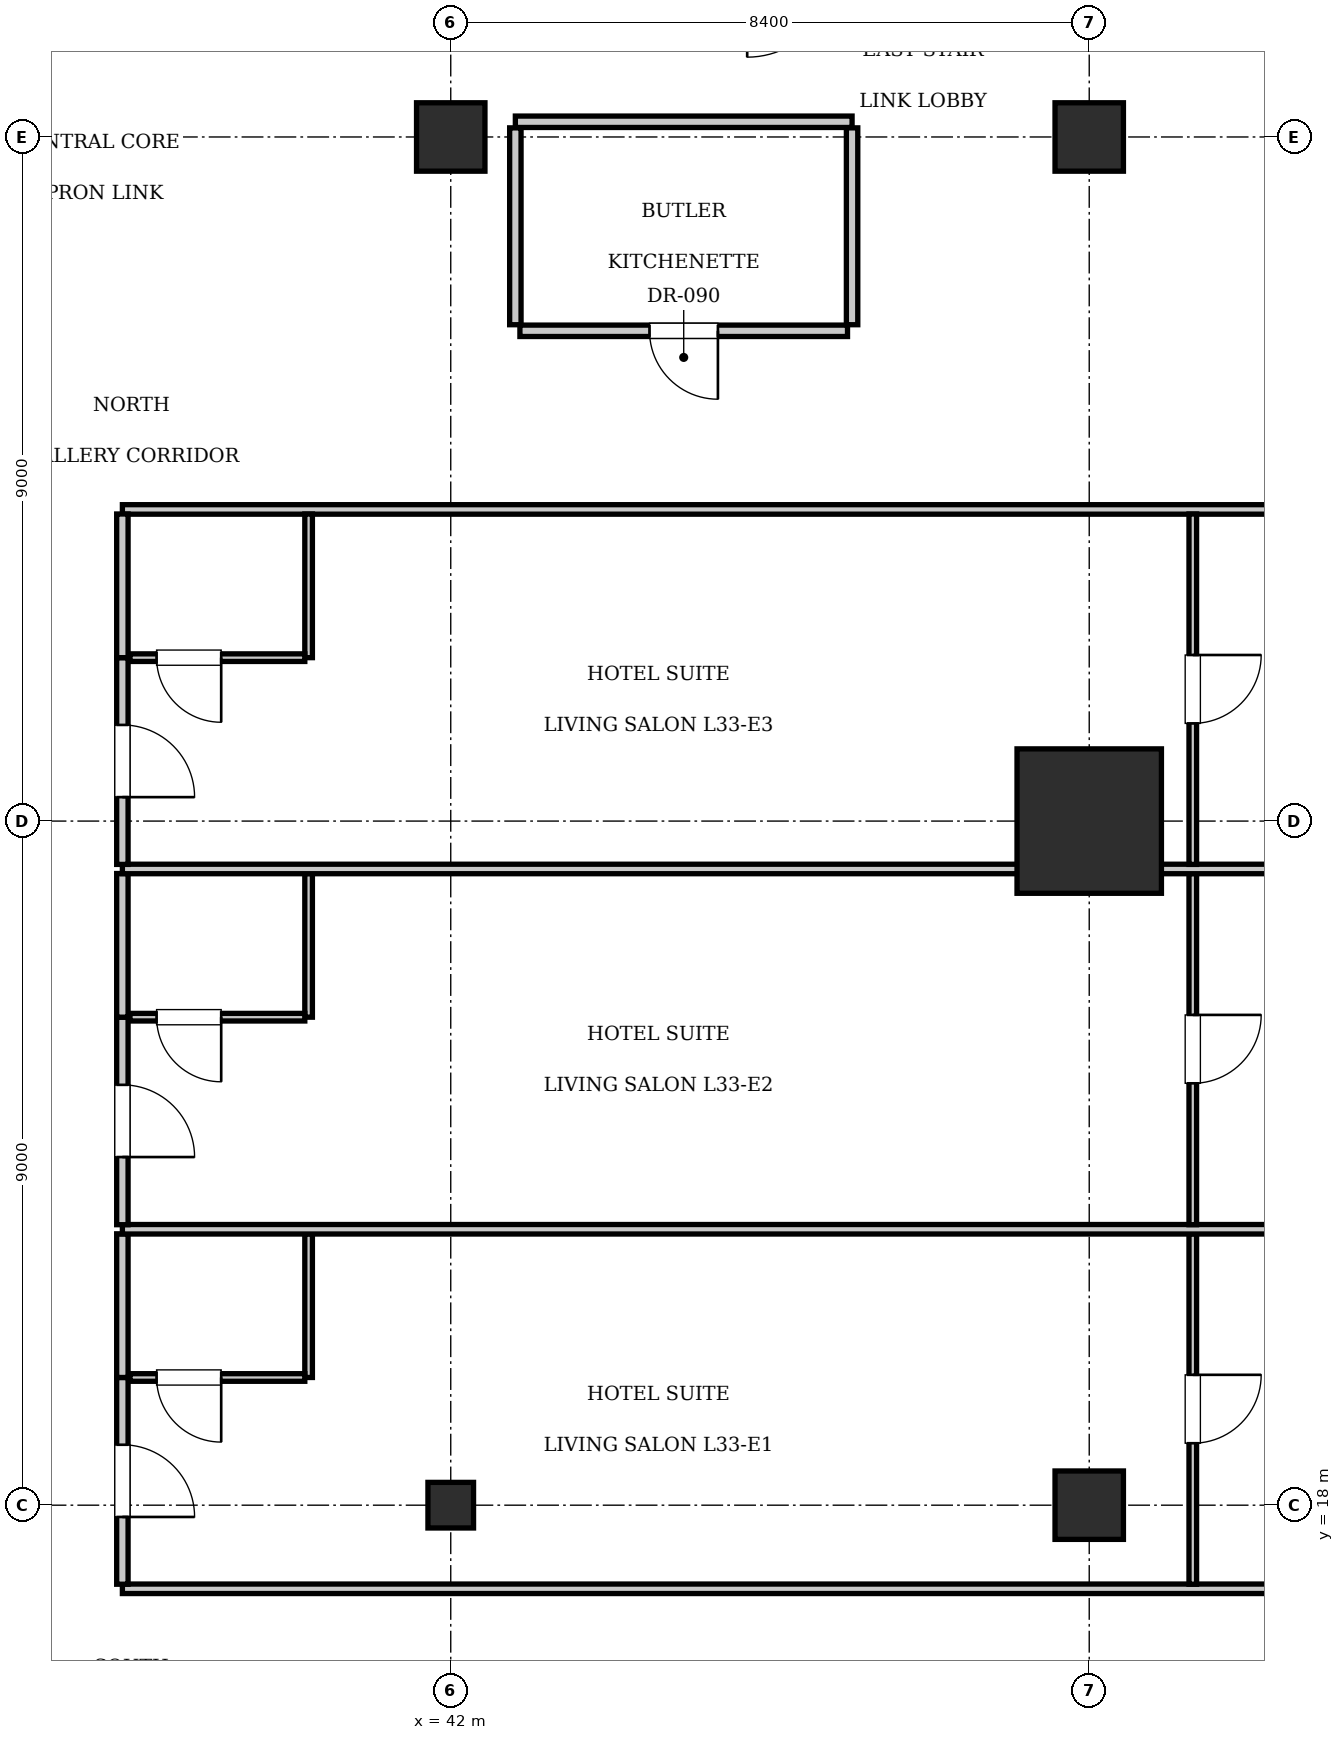
"""IFC4 building model, lengths in metres.
Left out: names, types, materials, properties, quantities, classifications, styles, units other than length and angle.
Written with IfcOpenShell. Run it as: python <this file> out.ifc"""

import sys

from ifc_helpers import new_model, si_unit, direction, frame, frame_2d, origin, origin_2d, place, context, subcontext, project, spatial, rectangle, i_section, extrude, element, fill, save


model = new_model("IFC4")
c1 = context("Model", 3, precision=1e-05, world=origin(), true_north=direction((0.0, 1.0)))
c2 = subcontext(c1, "Body", "Model", "MODEL_VIEW")
j1 = project(units=[si_unit("LENGTHUNIT", "METRE"), si_unit("PLANEANGLEUNIT", "RADIAN")], contexts=[c1])
p1 = place(None, origin())
s1 = spatial("IfcSite", under=j1, at=p1, CompositionType="ELEMENT")
p2 = place(p1, origin())
s2 = spatial("IfcBuilding", under=s1, at=p2, CompositionType="ELEMENT")
p3 = place(p2, frame((0.0, 0.0, 138.95)))
s3 = spatial("IfcBuildingStorey", under=s2, at=p3, CompositionType="ELEMENT", Elevation=138.95)
p4 = place(p3, frame((50.4, 27.0, 0.0), z_axis=(0.0, 0.0, 1.0), x_axis=(1.0, 0.0, 0.0)))
e1 = element("IfcColumn", 1, at=p4, inside=s3, PredefinedType="COLUMN", context=c2, shape_type="SweptSolid", body=[
    extrude(rectangle(XDim=1.9, YDim=1.9, at=origin_2d()), origin(), (0.0, 0.0, 1.0), 3.85),
])
for number, where, z_axis, x_axis in (
    (2, (42.0, 36.0, 0.0), (0.0, 0.0, 1.0), (1.0, 0.0, 0.0)),
    (3, (50.4, 36.0, 0.0), (0.0, 0.0, 1.0), (1.0, 0.0, 0.0)),
    (4, (50.4, 18.0, 0.0), (0.0, 0.0, 1.0), (1.0, 0.0, 0.0)),
):
    element("IfcColumn", number, at=place(p3, frame(where, z_axis=z_axis, x_axis=x_axis)), inside=s3, PredefinedType="COLUMN", context=c2, shape_type="SweptSolid", body=[
        extrude(rectangle(XDim=0.9, YDim=0.9, at=origin_2d()), origin(), (0.0, 0.0, 1.0), 3.85),
    ])
p5 = place(p3, frame((42.0, 18.0, 0.0), z_axis=(0.0, 0.0, 1.0), x_axis=(1.0, 0.0, 0.0)))
e5 = element("IfcColumn", 5, at=p5, inside=s3, PredefinedType="COLUMN", context=c2, shape_type="SweptSolid", body=[
    extrude(i_section(OverallWidth=0.6, OverallDepth=0.6, WebThickness=0.025, FlangeThickness=0.038, at=origin_2d()), origin(), (0.0, 0.0, 1.0), 3.85),
])
p6 = place(p3, frame((42.85, 36.2, 0.0), z_axis=(0.0, 0.0, 1.0), x_axis=(1.0, 0.0, 0.0)))
e6 = element("IfcWall", 6, at=p6, inside=s3, PredefinedType="PARTITIONING", context=c2, shape_type="SweptSolid", body=[
    extrude(rectangle(XDim=4.43, YDim=0.15, at=frame_2d((2.215, 0.0))), origin(), (0.0, 0.0, 1.0), 3.61),
])
for number, where, z_axis, x_axis in (
    (7, (42.85, 33.53, 0.0), (0.0, 0.0, 1.0), (0.0, 1.0, 0.0)),
    (8, (47.28, 33.53, 0.0), (0.0, 0.0, 1.0), (0.0, 1.0, 0.0)),
):
    element("IfcWall", number, at=place(p3, frame(where, z_axis=z_axis, x_axis=x_axis)), inside=s3, PredefinedType="PARTITIONING", context=c2, shape_type="SweptSolid", body=[
        extrude(rectangle(XDim=2.59, YDim=0.15, at=frame_2d((1.295, 0.0))), origin(), (0.0, 0.0, 1.0), 3.61),
    ])
p7 = place(p3, frame((42.91, 33.45, 0.0), z_axis=(0.0, 0.0, 1.0), x_axis=(1.0, 0.0, 0.0)))
e9 = element("IfcWall", 9, at=p7, inside=s3, PredefinedType="PARTITIONING", context=c2, shape_type="SweptSolid", body=[
    extrude(rectangle(XDim=4.31, YDim=0.15, at=frame_2d((2.155, 0.0))), origin(), (0.0, 0.0, 1.0), 3.61),
])
p8 = place(p7, frame((1.705, 0.0, 0.0)))
e10 = element("IfcOpeningElement", 10, at=p8, cuts=e9, PredefinedType="OPENING", context=c2, shape_type="SweptSolid", body=[
    extrude(rectangle(XDim=0.9, YDim=2.1, at=frame_2d((0.45, 1.05))), frame((0.0, 0.085, 0.0), z_axis=(0.0, -1.0, 0.0), x_axis=(1.0, 0.0, 0.0)), (0.0, 0.0, 1.0), 0.17),
])
for number, where, z_axis, x_axis in (
    (11, (37.68, 16.9, 0.0), (0.0, 0.0, 1.0), (1.0, 0.0, 0.0)),
    (12, (37.68, 31.1, 0.0), (0.0, 0.0, 1.0), (1.0, 0.0, 0.0)),
):
    element("IfcWall", number, at=place(p3, frame(where, z_axis=z_axis, x_axis=x_axis)), inside=s3, PredefinedType="PARTITIONING", context=c2, shape_type="SweptSolid", body=[
        extrude(rectangle(XDim=24.72, YDim=0.125, at=frame_2d((12.36, 0.0))), origin(), (0.0, 0.0, 1.0), 3.61),
    ])
p9 = place(p3, frame((37.68, 16.96, 0.0), z_axis=(0.0, 0.0, 1.0), x_axis=(0.0, 1.0, 0.0)))
e13 = element("IfcWall", 13, at=p9, inside=s3, PredefinedType="PARTITIONING", context=c2, shape_type="SweptSolid", body=[
    extrude(rectangle(XDim=2.72, YDim=0.15, at=frame_2d((1.36, 0.0))), origin(), (0.0, 0.0, 1.0), 3.255),
])
p10 = place(p9, frame((0.885, 0.0, 0.0)))
e14 = element("IfcOpeningElement", 14, at=p10, cuts=e13, PredefinedType="OPENING", context=c2, shape_type="SweptSolid", body=[
    extrude(rectangle(XDim=0.95, YDim=2.15, at=frame_2d((0.475, 1.075))), frame((0.0, 0.085, 0.0), z_axis=(0.0, -1.0, 0.0), x_axis=(1.0, 0.0, 0.0)), (0.0, 0.0, 1.0), 0.17),
])
p11 = place(p3, frame((37.68, 19.68, 0.0), z_axis=(0.0, 0.0, 1.0), x_axis=(0.0, 1.0, 0.0)))
e15 = element("IfcWall", 15, at=p11, inside=s3, PredefinedType="PARTITIONING", context=c2, shape_type="SweptSolid", body=[
    extrude(rectangle(XDim=1.89, YDim=0.15, at=frame_2d((0.945, 0.0))), origin(), (0.0, 0.0, 1.0), 3.61),
])
p12 = place(p3, frame((40.13, 19.68, 0.0), z_axis=(0.0, 0.0, 1.0), x_axis=(0.0, 1.0, 0.0)))
e16 = element("IfcWall", 16, at=p12, inside=s3, PredefinedType="PARTITIONING", context=c2, shape_type="SweptSolid", body=[
    extrude(rectangle(XDim=1.89, YDim=0.1, at=frame_2d((0.945, 0.0))), origin(), (0.0, 0.0, 1.0), 3.61),
])
p13 = place(p3, frame((37.78, 19.68, 0.0), z_axis=(0.0, 0.0, 1.0), x_axis=(1.0, 0.0, 0.0)))
e17 = element("IfcWall", 17, at=p13, inside=s3, PredefinedType="PARTITIONING", context=c2, shape_type="SweptSolid", body=[
    extrude(rectangle(XDim=2.3, YDim=0.1, at=frame_2d((1.15, 0.0))), origin(), (0.0, 0.0, 1.0), 3.61),
])
p14 = place(p13, frame((0.35, 0.0, 0.0)))
e18 = element("IfcOpeningElement", 18, at=p14, cuts=e17, PredefinedType="OPENING", context=c2, shape_type="SweptSolid", body=[
    extrude(rectangle(XDim=0.85, YDim=2.1, at=frame_2d((0.425, 1.05))), frame((0.0, 0.06, 0.0), z_axis=(0.0, -1.0, 0.0), x_axis=(1.0, 0.0, 0.0)), (0.0, 0.0, 1.0), 0.12),
])
p15 = place(p3, frame((51.762, 16.96, 0.0), z_axis=(0.0, 0.0, 1.0), x_axis=(0.0, 1.0, 0.0)))
e19 = element("IfcWall", 19, at=p15, inside=s3, PredefinedType="PARTITIONING", context=c2, shape_type="SweptSolid", body=[
    extrude(rectangle(XDim=4.61, YDim=0.1, at=frame_2d((2.305, 0.0))), origin(), (0.0, 0.0, 1.0), 3.61),
])
p16 = place(p15, frame((1.855, 0.0, 0.0)))
e20 = element("IfcOpeningElement", 20, at=p16, cuts=e19, PredefinedType="OPENING", context=c2, shape_type="SweptSolid", body=[
    extrude(rectangle(XDim=0.9, YDim=2.1, at=frame_2d((0.45, 1.05))), frame((0.0, 0.06, 0.0), z_axis=(0.0, -1.0, 0.0), x_axis=(1.0, 0.0, 0.0)), (0.0, 0.0, 1.0), 0.12),
])
p17 = place(p3, frame((37.68, 21.63, 0.0), z_axis=(0.0, 0.0, 1.0), x_axis=(1.0, 0.0, 0.0)))
e21 = element("IfcWall", 21, at=p17, inside=s3, PredefinedType="PARTITIONING", context=c2, shape_type="SweptSolid", body=[
    extrude(rectangle(XDim=24.72, YDim=0.125, at=frame_2d((12.36, 0.0))), origin(), (0.0, 0.0, 1.0), 3.61),
])
p18 = place(p3, frame((37.68, 21.69, 0.0), z_axis=(0.0, 0.0, 1.0), x_axis=(0.0, 1.0, 0.0)))
e22 = element("IfcWall", 22, at=p18, inside=s3, PredefinedType="PARTITIONING", context=c2, shape_type="SweptSolid", body=[
    extrude(rectangle(XDim=2.73, YDim=0.15, at=frame_2d((1.365, 0.0))), origin(), (0.0, 0.0, 1.0), 3.61),
])
p19 = place(p18, frame((0.89, 0.0, 0.0)))
e23 = element("IfcOpeningElement", 23, at=p19, cuts=e22, PredefinedType="OPENING", context=c2, shape_type="SweptSolid", body=[
    extrude(rectangle(XDim=0.95, YDim=2.15, at=frame_2d((0.475, 1.075))), frame((0.0, 0.085, 0.0), z_axis=(0.0, -1.0, 0.0), x_axis=(1.0, 0.0, 0.0)), (0.0, 0.0, 1.0), 0.17),
])
p20 = place(p3, frame((37.68, 24.42, 0.0), z_axis=(0.0, 0.0, 1.0), x_axis=(0.0, 1.0, 0.0)))
e24 = element("IfcWall", 24, at=p20, inside=s3, PredefinedType="PARTITIONING", context=c2, shape_type="SweptSolid", body=[
    extrude(rectangle(XDim=1.89, YDim=0.15, at=frame_2d((0.945, 0.0))), origin(), (0.0, 0.0, 1.0), 3.61),
])
p21 = place(p3, frame((40.13, 24.42, 0.0), z_axis=(0.0, 0.0, 1.0), x_axis=(0.0, 1.0, 0.0)))
e25 = element("IfcWall", 25, at=p21, inside=s3, PredefinedType="PARTITIONING", context=c2, shape_type="SweptSolid", body=[
    extrude(rectangle(XDim=1.89, YDim=0.1, at=frame_2d((0.945, 0.0))), origin(), (0.0, 0.0, 1.0), 3.61),
])
p22 = place(p3, frame((37.78, 24.42, 0.0), z_axis=(0.0, 0.0, 1.0), x_axis=(1.0, 0.0, 0.0)))
e26 = element("IfcWall", 26, at=p22, inside=s3, PredefinedType="PARTITIONING", context=c2, shape_type="SweptSolid", body=[
    extrude(rectangle(XDim=2.3, YDim=0.1, at=frame_2d((1.15, 0.0))), origin(), (0.0, 0.0, 1.0), 3.61),
])
p23 = place(p22, frame((0.35, 0.0, 0.0)))
e27 = element("IfcOpeningElement", 27, at=p23, cuts=e26, PredefinedType="OPENING", context=c2, shape_type="SweptSolid", body=[
    extrude(rectangle(XDim=0.85, YDim=2.1, at=frame_2d((0.425, 1.05))), frame((0.0, 0.06, 0.0), z_axis=(0.0, -1.0, 0.0), x_axis=(1.0, 0.0, 0.0)), (0.0, 0.0, 1.0), 0.12),
])
p24 = place(p3, frame((51.762, 21.69, 0.0), z_axis=(0.0, 0.0, 1.0), x_axis=(0.0, 1.0, 0.0)))
e28 = element("IfcWall", 28, at=p24, inside=s3, PredefinedType="PARTITIONING", context=c2, shape_type="SweptSolid", body=[
    extrude(rectangle(XDim=4.62, YDim=0.1, at=frame_2d((2.31, 0.0))), origin(), (0.0, 0.0, 1.0), 3.61),
])
p25 = place(p24, frame((1.86, 0.0, 0.0)))
e29 = element("IfcOpeningElement", 29, at=p25, cuts=e28, PredefinedType="OPENING", context=c2, shape_type="SweptSolid", body=[
    extrude(rectangle(XDim=0.9, YDim=2.1, at=frame_2d((0.45, 1.05))), frame((0.0, 0.06, 0.0), z_axis=(0.0, -1.0, 0.0), x_axis=(1.0, 0.0, 0.0)), (0.0, 0.0, 1.0), 0.12),
])
p26 = place(p3, frame((37.68, 26.37, 0.0), z_axis=(0.0, 0.0, 1.0), x_axis=(1.0, 0.0, 0.0)))
e30 = element("IfcWall", 30, at=p26, inside=s3, PredefinedType="PARTITIONING", context=c2, shape_type="SweptSolid", body=[
    extrude(rectangle(XDim=24.72, YDim=0.125, at=frame_2d((12.36, 0.0))), origin(), (0.0, 0.0, 1.0), 3.61),
])
p27 = place(p3, frame((37.68, 26.43, 0.0), z_axis=(0.0, 0.0, 1.0), x_axis=(0.0, 1.0, 0.0)))
e31 = element("IfcWall", 31, at=p27, inside=s3, PredefinedType="PARTITIONING", context=c2, shape_type="SweptSolid", body=[
    extrude(rectangle(XDim=2.72, YDim=0.15, at=frame_2d((1.36, 0.0))), origin(), (0.0, 0.0, 1.0), 3.61),
])
p28 = place(p27, frame((0.885, 0.0, 0.0)))
e32 = element("IfcOpeningElement", 32, at=p28, cuts=e31, PredefinedType="OPENING", context=c2, shape_type="SweptSolid", body=[
    extrude(rectangle(XDim=0.95, YDim=2.15, at=frame_2d((0.475, 1.075))), frame((0.0, 0.085, 0.0), z_axis=(0.0, -1.0, 0.0), x_axis=(1.0, 0.0, 0.0)), (0.0, 0.0, 1.0), 0.17),
])
p29 = place(p3, frame((37.68, 29.15, 0.0), z_axis=(0.0, 0.0, 1.0), x_axis=(0.0, 1.0, 0.0)))
e33 = element("IfcWall", 33, at=p29, inside=s3, PredefinedType="PARTITIONING", context=c2, shape_type="SweptSolid", body=[
    extrude(rectangle(XDim=1.89, YDim=0.15, at=frame_2d((0.945, 0.0))), origin(), (0.0, 0.0, 1.0), 3.61),
])
p30 = place(p3, frame((40.13, 29.15, 0.0), z_axis=(0.0, 0.0, 1.0), x_axis=(0.0, 1.0, 0.0)))
e34 = element("IfcWall", 34, at=p30, inside=s3, PredefinedType="PARTITIONING", context=c2, shape_type="SweptSolid", body=[
    extrude(rectangle(XDim=1.89, YDim=0.1, at=frame_2d((0.945, 0.0))), origin(), (0.0, 0.0, 1.0), 3.61),
])
p31 = place(p3, frame((37.78, 29.15, 0.0), z_axis=(0.0, 0.0, 1.0), x_axis=(1.0, 0.0, 0.0)))
e35 = element("IfcWall", 35, at=p31, inside=s3, PredefinedType="PARTITIONING", context=c2, shape_type="SweptSolid", body=[
    extrude(rectangle(XDim=2.3, YDim=0.1, at=frame_2d((1.15, 0.0))), origin(), (0.0, 0.0, 1.0), 3.61),
])
p32 = place(p31, frame((0.35, 0.0, 0.0)))
e36 = element("IfcOpeningElement", 36, at=p32, cuts=e35, PredefinedType="OPENING", context=c2, shape_type="SweptSolid", body=[
    extrude(rectangle(XDim=0.85, YDim=2.1, at=frame_2d((0.425, 1.05))), frame((0.0, 0.06, 0.0), z_axis=(0.0, -1.0, 0.0), x_axis=(1.0, 0.0, 0.0)), (0.0, 0.0, 1.0), 0.12),
])
p33 = place(p3, frame((51.762, 26.43, 0.0), z_axis=(0.0, 0.0, 1.0), x_axis=(0.0, 1.0, 0.0)))
e37 = element("IfcWall", 37, at=p33, inside=s3, PredefinedType="PARTITIONING", context=c2, shape_type="SweptSolid", body=[
    extrude(rectangle(XDim=4.61, YDim=0.1, at=frame_2d((2.305, 0.0))), origin(), (0.0, 0.0, 1.0), 3.61),
])
p34 = place(p33, frame((1.855, 0.0, 0.0)))
e38 = element("IfcOpeningElement", 38, at=p34, cuts=e37, PredefinedType="OPENING", context=c2, shape_type="SweptSolid", body=[
    extrude(rectangle(XDim=0.9, YDim=2.1, at=frame_2d((0.45, 1.05))), frame((0.0, 0.06, 0.0), z_axis=(0.0, -1.0, 0.0), x_axis=(1.0, 0.0, 0.0)), (0.0, 0.0, 1.0), 0.12),
])
p35 = place(p8, frame((0.9, 0.0, 0.0), z_axis=(0.0, 0.0, 1.0), x_axis=(-1.0, 0.0, 0.0)))
e39 = element("IfcDoor", 39, at=p35, inside=s3, OperationType="SINGLE_SWING_LEFT", PredefinedType="DOOR", context=c2, shape_type="SweptSolid", body=[
    extrude(rectangle(XDim=0.9, YDim=2.1, at=frame_2d((0.45, 1.05))), frame((0.0, 0.025, 0.0), z_axis=(0.0, -1.0, 0.0), x_axis=(1.0, 0.0, 0.0)), (0.0, 0.0, 1.0), 0.05),
])
fill(e10, e39)
p36 = place(p14, frame((0.85, 0.0, 0.0), z_axis=(0.0, 0.0, 1.0), x_axis=(-1.0, 0.0, 0.0)))
e40 = element("IfcDoor", 40, at=p36, inside=s3, OperationType="SINGLE_SWING_LEFT", PredefinedType="DOOR", context=c2, shape_type="SweptSolid", body=[
    extrude(rectangle(XDim=0.85, YDim=2.1, at=frame_2d((0.425, 1.05))), frame((0.0, 0.025, 0.0), z_axis=(0.0, -1.0, 0.0), x_axis=(1.0, 0.0, 0.0)), (0.0, 0.0, 1.0), 0.05),
])
fill(e18, e40)
p37 = place(p10, frame((0.95, 0.0, 0.0), z_axis=(0.0, 0.0, 1.0), x_axis=(-1.0, 0.0, 0.0)))
e41 = element("IfcDoor", 41, at=p37, inside=s3, OperationType="SINGLE_SWING_RIGHT", PredefinedType="DOOR", context=c2, shape_type="SweptSolid", body=[
    extrude(rectangle(XDim=0.95, YDim=2.15, at=frame_2d((0.475, 1.075))), frame((0.0, 0.025, 0.0), z_axis=(0.0, -1.0, 0.0), x_axis=(1.0, 0.0, 0.0)), (0.0, 0.0, 1.0), 0.05),
])
fill(e14, e41)
p38 = place(p16, frame((0.9, 0.0, 0.0), z_axis=(0.0, 0.0, 1.0), x_axis=(-1.0, 0.0, 0.0)))
e42 = element("IfcDoor", 42, at=p38, inside=s3, OperationType="SINGLE_SWING_LEFT", PredefinedType="DOOR", context=c2, shape_type="SweptSolid", body=[
    extrude(rectangle(XDim=0.9, YDim=2.1, at=frame_2d((0.45, 1.05))), frame((0.0, 0.025, 0.0), z_axis=(0.0, -1.0, 0.0), x_axis=(1.0, 0.0, 0.0)), (0.0, 0.0, 1.0), 0.05),
])
fill(e20, e42)
p39 = place(p23, frame((0.85, 0.0, 0.0), z_axis=(0.0, 0.0, 1.0), x_axis=(-1.0, 0.0, 0.0)))
e43 = element("IfcDoor", 43, at=p39, inside=s3, OperationType="SINGLE_SWING_LEFT", PredefinedType="DOOR", context=c2, shape_type="SweptSolid", body=[
    extrude(rectangle(XDim=0.85, YDim=2.1, at=frame_2d((0.425, 1.05))), frame((0.0, 0.025, 0.0), z_axis=(0.0, -1.0, 0.0), x_axis=(1.0, 0.0, 0.0)), (0.0, 0.0, 1.0), 0.05),
])
fill(e27, e43)
p40 = place(p19, frame((0.95, 0.0, 0.0), z_axis=(0.0, 0.0, 1.0), x_axis=(-1.0, 0.0, 0.0)))
e44 = element("IfcDoor", 44, at=p40, inside=s3, OperationType="SINGLE_SWING_RIGHT", PredefinedType="DOOR", context=c2, shape_type="SweptSolid", body=[
    extrude(rectangle(XDim=0.95, YDim=2.15, at=frame_2d((0.475, 1.075))), frame((0.0, 0.025, 0.0), z_axis=(0.0, -1.0, 0.0), x_axis=(1.0, 0.0, 0.0)), (0.0, 0.0, 1.0), 0.05),
])
fill(e23, e44)
p41 = place(p25, frame((0.9, 0.0, 0.0), z_axis=(0.0, 0.0, 1.0), x_axis=(-1.0, 0.0, 0.0)))
e45 = element("IfcDoor", 45, at=p41, inside=s3, OperationType="SINGLE_SWING_LEFT", PredefinedType="DOOR", context=c2, shape_type="SweptSolid", body=[
    extrude(rectangle(XDim=0.9, YDim=2.1, at=frame_2d((0.45, 1.05))), frame((0.0, 0.025, 0.0), z_axis=(0.0, -1.0, 0.0), x_axis=(1.0, 0.0, 0.0)), (0.0, 0.0, 1.0), 0.05),
])
fill(e29, e45)
p42 = place(p32, frame((0.85, 0.0, 0.0), z_axis=(0.0, 0.0, 1.0), x_axis=(-1.0, 0.0, 0.0)))
e46 = element("IfcDoor", 46, at=p42, inside=s3, OperationType="SINGLE_SWING_LEFT", PredefinedType="DOOR", context=c2, shape_type="SweptSolid", body=[
    extrude(rectangle(XDim=0.85, YDim=2.1, at=frame_2d((0.425, 1.05))), frame((0.0, 0.025, 0.0), z_axis=(0.0, -1.0, 0.0), x_axis=(1.0, 0.0, 0.0)), (0.0, 0.0, 1.0), 0.05),
])
fill(e36, e46)
p43 = place(p28, frame((0.95, 0.0, 0.0), z_axis=(0.0, 0.0, 1.0), x_axis=(-1.0, 0.0, 0.0)))
e47 = element("IfcDoor", 47, at=p43, inside=s3, OperationType="SINGLE_SWING_RIGHT", PredefinedType="DOOR", context=c2, shape_type="SweptSolid", body=[
    extrude(rectangle(XDim=0.95, YDim=2.15, at=frame_2d((0.475, 1.075))), frame((0.0, 0.025, 0.0), z_axis=(0.0, -1.0, 0.0), x_axis=(1.0, 0.0, 0.0)), (0.0, 0.0, 1.0), 0.05),
])
fill(e32, e47)
p44 = place(p34, frame((0.9, 0.0, 0.0), z_axis=(0.0, 0.0, 1.0), x_axis=(-1.0, 0.0, 0.0)))
e48 = element("IfcDoor", 48, at=p44, inside=s3, OperationType="SINGLE_SWING_LEFT", PredefinedType="DOOR", context=c2, shape_type="SweptSolid", body=[
    extrude(rectangle(XDim=0.9, YDim=2.1, at=frame_2d((0.45, 1.05))), frame((0.0, 0.025, 0.0), z_axis=(0.0, -1.0, 0.0), x_axis=(1.0, 0.0, 0.0)), (0.0, 0.0, 1.0), 0.05),
])
fill(e38, e48)
save(model, sys.argv[1])
